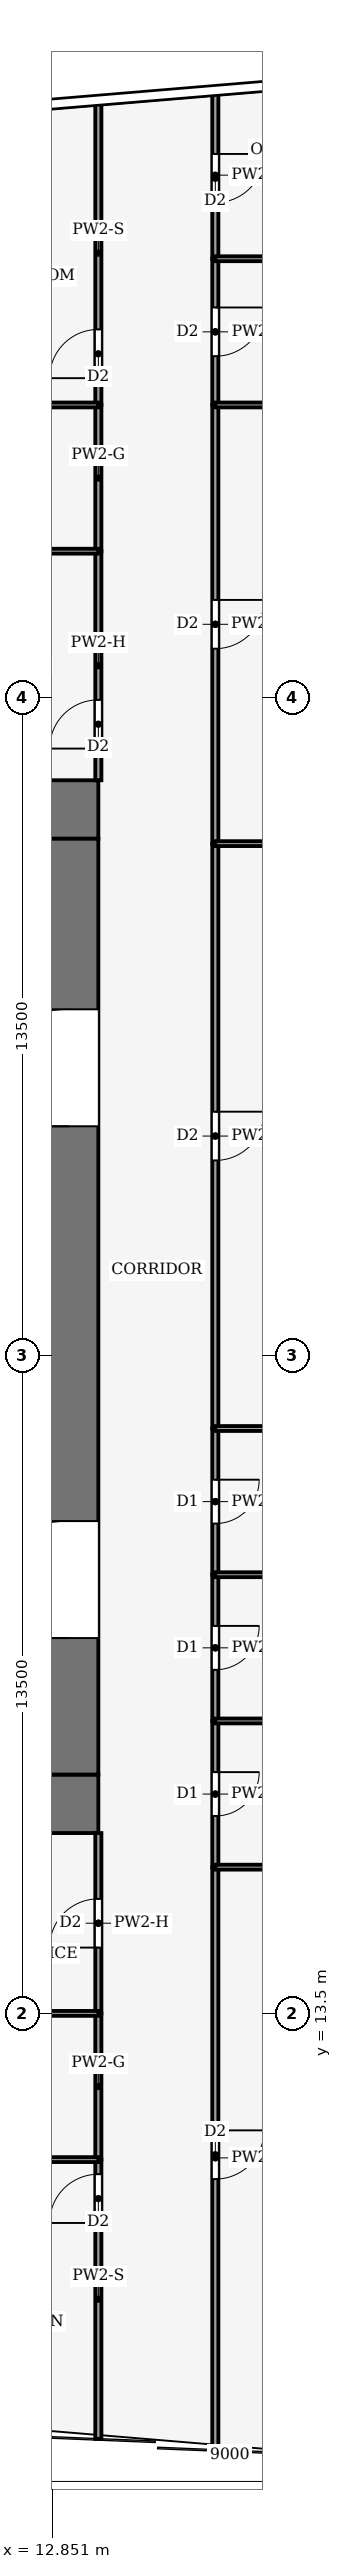
"""IFC4 building model, lengths in metres.
Left out: names, types, materials, properties, quantities, classifications, styles, units other than length and angle.
Written with IfcOpenShell. Run it as: python <this file> out.ifc"""

import sys

from ifc_helpers import new_model, si_unit, direction, frame, frame_2d, origin, place, context, subcontext, project, spatial, rectangle, extrude, element, fill, save


model = new_model("IFC4")
c1 = context("Model", 3, precision=1e-05, world=origin(), true_north=direction((0.0, 1.0)))
c2 = subcontext(c1, "Body", "Model", "MODEL_VIEW")
j1 = project(units=[si_unit("LENGTHUNIT", "METRE"), si_unit("PLANEANGLEUNIT", "RADIAN")], contexts=[c1])
p1 = place(None, origin())
s1 = spatial("IfcSite", under=j1, at=p1, CompositionType="ELEMENT")
p2 = place(p1, origin())
s2 = spatial("IfcBuilding", under=s1, at=p2, CompositionType="ELEMENT")
p3 = place(p2, frame((0.0, 0.0, 78.0)))
s3 = spatial("IfcBuildingStorey", under=s2, at=p3, CompositionType="ELEMENT", Elevation=78.0)
for number, where, z_axis, x_axis in (
    (1, (-13.8, 17.8, -0.13), (0.0, 0.0, 1.0), (1.0, 0.0, 0.0)),
    (2, (-13.8, 38.2, -0.13), (0.0, 0.0, 1.0), (1.0, 0.0, 0.0)),
):
    element("IfcWall", number, at=place(p3, frame(where, z_axis=z_axis, x_axis=x_axis)), inside=s3, PredefinedType="SHEAR", context=c2, shape_type="SweptSolid", body=[
        extrude(rectangle(XDim=27.6, YDim=1.2, at=frame_2d((13.8, 0.0))), origin(), (0.0, 0.0, 1.0), 4.0),
    ])
p4 = place(p3, frame((13.2, 18.4, -0.13), z_axis=(0.0, 0.0, 1.0), x_axis=(0.0, 1.0, 0.0)))
e3 = element("IfcWall", 3, at=p4, inside=s3, PredefinedType="SHEAR", context=c2, shape_type="SweptSolid", body=[
    extrude(rectangle(XDim=19.2, YDim=1.2, at=frame_2d((9.6, 0.0))), origin(), (0.0, 0.0, 1.0), 4.0),
])
p5 = place(p4, frame((2.8, 0.0, 0.13)))
e4 = element("IfcOpeningElement", 4, at=p5, cuts=e3, PredefinedType="OPENING", context=c2, shape_type="SweptSolid", body=[
    extrude(rectangle(XDim=2.4, YDim=2.4, at=frame_2d((1.2, 1.2))), frame((0.0, 0.61, 0.0), z_axis=(0.0, -1.0, 0.0), x_axis=(1.0, 0.0, 0.0)), (0.0, 0.0, 1.0), 1.22),
])
p6 = place(p4, frame((13.3, 0.0, 0.13)))
e5 = element("IfcOpeningElement", 5, at=p6, cuts=e3, PredefinedType="OPENING", context=c2, shape_type="SweptSolid", body=[
    extrude(rectangle(XDim=2.4, YDim=2.4, at=frame_2d((1.2, 1.2))), frame((0.0, 0.61, 0.0), z_axis=(0.0, -1.0, 0.0), x_axis=(1.0, 0.0, 0.0)), (0.0, 0.0, 1.0), 1.22),
])
p7 = place(p3, frame((16.2, 16.5, 0.0), z_axis=(0.0, 0.0, 1.0), x_axis=(0.0, -1.0, 0.0)))
e6 = element("IfcWall", 6, at=p7, inside=s3, PredefinedType="PARTITIONING", context=c2, shape_type="SweptSolid", body=[
    extrude(rectangle(XDim=11.93, YDim=0.125, at=frame_2d((5.965, 0.0))), origin(), (0.0, 0.0, 1.0), 3.04),
])
p8 = place(p7, frame((5.4, 0.0, 0.0)))
e7 = element("IfcOpeningElement", 7, at=p8, cuts=e6, PredefinedType="OPENING", context=c2, shape_type="SweptSolid", body=[
    extrude(rectangle(XDim=1.0, YDim=2.1, at=frame_2d((0.5, 1.05))), frame((0.0, 0.073, 0.0), z_axis=(0.0, -1.0, 0.0), x_axis=(1.0, 0.0, 0.0)), (0.0, 0.0, 1.0), 0.145),
])
p9 = place(p3, frame((16.2, 19.5, 0.0), z_axis=(0.0, 0.0, 1.0), x_axis=(0.0, -1.0, 0.0)))
e8 = element("IfcWall", 8, at=p9, inside=s3, PredefinedType="PARTITIONING", context=c2, shape_type="SweptSolid", body=[
    extrude(rectangle(XDim=3.0, YDim=0.125, at=frame_2d((1.5, 0.0))), origin(), (0.0, 0.0, 1.0), 3.14),
])
p10 = place(p9, frame((1.05, 0.0, 0.0)))
e9 = element("IfcOpeningElement", 9, at=p10, cuts=e8, PredefinedType="OPENING", context=c2, shape_type="SweptSolid", body=[
    extrude(rectangle(XDim=0.9, YDim=2.1, at=frame_2d((0.45, 1.05))), frame((0.0, 0.073, 0.0), z_axis=(0.0, -1.0, 0.0), x_axis=(1.0, 0.0, 0.0)), (0.0, 0.0, 1.0), 0.145),
])
p11 = place(p3, frame((16.2, 22.5, 0.0), z_axis=(0.0, 0.0, 1.0), x_axis=(0.0, -1.0, 0.0)))
e10 = element("IfcWall", 10, at=p11, inside=s3, PredefinedType="PARTITIONING", context=c2, shape_type="SweptSolid", body=[
    extrude(rectangle(XDim=3.0, YDim=0.125, at=frame_2d((1.5, 0.0))), origin(), (0.0, 0.0, 1.0), 3.87),
])
p12 = place(p11, frame((1.05, 0.0, 0.0)))
e11 = element("IfcOpeningElement", 11, at=p12, cuts=e10, PredefinedType="OPENING", context=c2, shape_type="SweptSolid", body=[
    extrude(rectangle(XDim=0.9, YDim=2.1, at=frame_2d((0.45, 1.05))), frame((0.0, 0.073, 0.0), z_axis=(0.0, -1.0, 0.0), x_axis=(1.0, 0.0, 0.0)), (0.0, 0.0, 1.0), 0.145),
])
p13 = place(p3, frame((16.2, 25.5, 0.0), z_axis=(0.0, 0.0, 1.0), x_axis=(0.0, -1.0, 0.0)))
e12 = element("IfcWall", 12, at=p13, inside=s3, PredefinedType="PARTITIONING", context=c2, shape_type="SweptSolid", body=[
    extrude(rectangle(XDim=3.0, YDim=0.125, at=frame_2d((1.5, 0.0))), origin(), (0.0, 0.0, 1.0), 3.48),
])
p14 = place(p13, frame((1.05, 0.0, 0.0)))
e13 = element("IfcOpeningElement", 13, at=p14, cuts=e12, PredefinedType="OPENING", context=c2, shape_type="SweptSolid", body=[
    extrude(rectangle(XDim=0.9, YDim=2.1, at=frame_2d((0.45, 1.05))), frame((0.0, 0.073, 0.0), z_axis=(0.0, -1.0, 0.0), x_axis=(1.0, 0.0, 0.0)), (0.0, 0.0, 1.0), 0.145),
])
p15 = place(p3, frame((16.2, 37.5, 0.0), z_axis=(0.0, 0.0, 1.0), x_axis=(0.0, -1.0, 0.0)))
e14 = element("IfcWall", 14, at=p15, inside=s3, PredefinedType="PARTITIONING", context=c2, shape_type="SweptSolid", body=[
    extrude(rectangle(XDim=12.0, YDim=0.125, at=frame_2d((6.0, 0.0))), origin(), (0.0, 0.0, 1.0), 3.48),
])
p16 = place(p15, frame((5.5, 0.0, 0.0)))
e15 = element("IfcOpeningElement", 15, at=p16, cuts=e14, PredefinedType="OPENING", context=c2, shape_type="SweptSolid", body=[
    extrude(rectangle(XDim=1.0, YDim=2.1, at=frame_2d((0.5, 1.05))), frame((0.0, 0.073, 0.0), z_axis=(0.0, -1.0, 0.0), x_axis=(1.0, 0.0, 0.0)), (0.0, 0.0, 1.0), 0.145),
])
p17 = place(p3, frame((16.2, 46.5, 0.0), z_axis=(0.0, 0.0, 1.0), x_axis=(0.0, -1.0, 0.0)))
e16 = element("IfcWall", 16, at=p17, inside=s3, PredefinedType="PARTITIONING", context=c2, shape_type="SweptSolid", body=[
    extrude(rectangle(XDim=9.0, YDim=0.125, at=frame_2d((4.5, 0.0))), origin(), (0.0, 0.0, 1.0), 3.14),
])
p18 = place(p17, frame((4.0, 0.0, 0.0)))
e17 = element("IfcOpeningElement", 17, at=p18, cuts=e16, PredefinedType="OPENING", context=c2, shape_type="SweptSolid", body=[
    extrude(rectangle(XDim=1.0, YDim=2.1, at=frame_2d((0.5, 1.05))), frame((0.0, 0.073, 0.0), z_axis=(0.0, -1.0, 0.0), x_axis=(1.0, 0.0, 0.0)), (0.0, 0.0, 1.0), 0.145),
])
p19 = place(p3, frame((16.2, 49.5, 0.0), z_axis=(0.0, 0.0, 1.0), x_axis=(0.0, -1.0, 0.0)))
e18 = element("IfcWall", 18, at=p19, inside=s3, PredefinedType="PARTITIONING", context=c2, shape_type="SweptSolid", body=[
    extrude(rectangle(XDim=3.0, YDim=0.125, at=frame_2d((1.5, 0.0))), origin(), (0.0, 0.0, 1.0), 3.87),
])
p20 = place(p19, frame((1.0, 0.0, 0.0)))
e19 = element("IfcOpeningElement", 19, at=p20, cuts=e18, PredefinedType="OPENING", context=c2, shape_type="SweptSolid", body=[
    extrude(rectangle(XDim=1.0, YDim=2.1, at=frame_2d((0.5, 1.05))), frame((0.0, 0.073, 0.0), z_axis=(0.0, -1.0, 0.0), x_axis=(1.0, 0.0, 0.0)), (0.0, 0.0, 1.0), 0.145),
])
p21 = place(p3, frame((16.2, 52.93, 0.0), z_axis=(0.0, 0.0, 1.0), x_axis=(0.0, -1.0, 0.0)))
e20 = element("IfcWall", 20, at=p21, inside=s3, PredefinedType="PARTITIONING", context=c2, shape_type="SweptSolid", body=[
    extrude(rectangle(XDim=3.43, YDim=0.125, at=frame_2d((1.715, 0.0))), origin(), (0.0, 0.0, 1.0), 3.04),
])
p22 = place(p21, frame((1.28, 0.0, 0.0)))
e21 = element("IfcOpeningElement", 21, at=p22, cuts=e20, PredefinedType="OPENING", context=c2, shape_type="SweptSolid", body=[
    extrude(rectangle(XDim=1.0, YDim=2.1, at=frame_2d((0.5, 1.05))), frame((0.0, 0.073, 0.0), z_axis=(0.0, -1.0, 0.0), x_axis=(1.0, 0.0, 0.0)), (0.0, 0.0, 1.0), 0.145),
])
p23 = place(p3, frame((13.8, 4.77, 0.0), z_axis=(0.0, 0.0, 1.0), x_axis=(0.0, 1.0, 0.0)))
e22 = element("IfcWall", 22, at=p23, inside=s3, PredefinedType="PARTITIONING", context=c2, shape_type="SweptSolid", body=[
    extrude(rectangle(XDim=5.73, YDim=0.125, at=frame_2d((2.865, 0.0))), origin(), (0.0, 0.0, 1.0), 3.04),
])
p24 = place(p23, frame((4.43, 0.0, 0.0)))
e23 = element("IfcOpeningElement", 23, at=p24, cuts=e22, PredefinedType="OPENING", context=c2, shape_type="SweptSolid", body=[
    extrude(rectangle(XDim=1.0, YDim=2.1, at=frame_2d((0.5, 1.05))), frame((0.0, 0.073, 0.0), z_axis=(0.0, -1.0, 0.0), x_axis=(1.0, 0.0, 0.0)), (0.0, 0.0, 1.0), 0.145),
])
p25 = place(p3, frame((13.8, 13.5, 0.0), z_axis=(0.0, 0.0, 1.0), x_axis=(0.0, -1.0, 0.0)))
e24 = element("IfcWall", 24, at=p25, inside=s3, PredefinedType="PARTITIONING", context=c2, shape_type="SweptSolid", body=[
    extrude(rectangle(XDim=3.0, YDim=0.125, at=frame_2d((1.5, 0.0))), origin(), (0.0, 0.0, 1.0), 3.87),
])
p26 = place(p3, frame((13.8, 13.5, 0.0), z_axis=(0.0, 0.0, 1.0), x_axis=(0.0, 1.0, 0.0)))
e25 = element("IfcWall", 25, at=p26, inside=s3, PredefinedType="PARTITIONING", context=c2, shape_type="SweptSolid", body=[
    extrude(rectangle(XDim=3.7, YDim=0.125, at=frame_2d((1.85, 0.0))), origin(), (0.0, 0.0, 1.0), 3.14),
])
p27 = place(p26, frame((1.35, 0.0, 0.0)))
e26 = element("IfcOpeningElement", 26, at=p27, cuts=e25, PredefinedType="OPENING", context=c2, shape_type="SweptSolid", body=[
    extrude(rectangle(XDim=1.0, YDim=2.1, at=frame_2d((0.5, 1.05))), frame((0.0, 0.073, 0.0), z_axis=(0.0, -1.0, 0.0), x_axis=(1.0, 0.0, 0.0)), (0.0, 0.0, 1.0), 0.145),
])
p28 = place(p3, frame((13.8, 38.8, 0.0), z_axis=(0.0, 0.0, 1.0), x_axis=(0.0, 1.0, 0.0)))
e27 = element("IfcWall", 27, at=p28, inside=s3, PredefinedType="PARTITIONING", context=c2, shape_type="SweptSolid", body=[
    extrude(rectangle(XDim=4.7, YDim=0.125, at=frame_2d((2.35, 0.0))), origin(), (0.0, 0.0, 1.0), 3.14),
])
p29 = place(p28, frame((0.65, 0.0, 0.0)))
e28 = element("IfcOpeningElement", 28, at=p29, cuts=e27, PredefinedType="OPENING", context=c2, shape_type="SweptSolid", body=[
    extrude(rectangle(XDim=1.0, YDim=2.1, at=frame_2d((0.5, 1.05))), frame((0.0, 0.073, 0.0), z_axis=(0.0, -1.0, 0.0), x_axis=(1.0, 0.0, 0.0)), (0.0, 0.0, 1.0), 0.145),
])
p30 = place(p3, frame((13.8, 46.5, 0.0), z_axis=(0.0, 0.0, 1.0), x_axis=(0.0, -1.0, 0.0)))
e29 = element("IfcWall", 29, at=p30, inside=s3, PredefinedType="PARTITIONING", context=c2, shape_type="SweptSolid", body=[
    extrude(rectangle(XDim=3.0, YDim=0.125, at=frame_2d((1.5, 0.0))), origin(), (0.0, 0.0, 1.0), 3.87),
])
p31 = place(p3, frame((13.8, 46.5, 0.0), z_axis=(0.0, 0.0, 1.0), x_axis=(0.0, 1.0, 0.0)))
e30 = element("IfcWall", 30, at=p31, inside=s3, PredefinedType="PARTITIONING", context=c2, shape_type="SweptSolid", body=[
    extrude(rectangle(XDim=6.23, YDim=0.125, at=frame_2d((3.115, 0.0))), origin(), (0.0, 0.0, 1.0), 3.04),
])
p32 = place(p31, frame((0.55, 0.0, 0.0)))
e31 = element("IfcOpeningElement", 31, at=p32, cuts=e30, PredefinedType="OPENING", context=c2, shape_type="SweptSolid", body=[
    extrude(rectangle(XDim=1.0, YDim=2.1, at=frame_2d((0.5, 1.05))), frame((0.0, 0.073, 0.0), z_axis=(0.0, -1.0, 0.0), x_axis=(1.0, 0.0, 0.0)), (0.0, 0.0, 1.0), 0.145),
])
p33 = place(p3, frame((23.587, 16.5, 0.0), z_axis=(0.0, 0.0, 1.0), x_axis=(-1.0, 0.0, 0.0)))
e32 = element("IfcWall", 32, at=p33, inside=s3, PredefinedType="PARTITIONING", context=c2, shape_type="SweptSolid", body=[
    extrude(rectangle(XDim=7.387, YDim=0.1, at=frame_2d((3.693, 0.0))), origin(), (0.0, 0.0, 1.0), 3.04),
])
p34 = place(p3, frame((23.34, 19.5, 0.0), z_axis=(0.0, 0.0, 1.0), x_axis=(-1.0, 0.0, 0.0)))
e33 = element("IfcWall", 33, at=p34, inside=s3, PredefinedType="PARTITIONING", context=c2, shape_type="SweptSolid", body=[
    extrude(rectangle(XDim=7.14, YDim=0.1, at=frame_2d((3.57, 0.0))), origin(), (0.0, 0.0, 1.0), 3.04),
])
p35 = place(p3, frame((23.094, 22.5, 0.0), z_axis=(0.0, 0.0, 1.0), x_axis=(-1.0, 0.0, 0.0)))
e34 = element("IfcWall", 34, at=p35, inside=s3, PredefinedType="PARTITIONING", context=c2, shape_type="SweptSolid", body=[
    extrude(rectangle(XDim=6.894, YDim=0.1, at=frame_2d((3.447, 0.0))), origin(), (0.0, 0.0, 1.0), 3.04),
])
p36 = place(p3, frame((22.847, 25.5, 0.0), z_axis=(0.0, 0.0, 1.0), x_axis=(-1.0, 0.0, 0.0)))
e35 = element("IfcWall", 35, at=p36, inside=s3, PredefinedType="PARTITIONING", context=c2, shape_type="SweptSolid", body=[
    extrude(rectangle(XDim=6.647, YDim=0.1, at=frame_2d((3.324, 0.0))), origin(), (0.0, 0.0, 1.0), 3.04),
])
p37 = place(p3, frame((23.299, 37.5, 0.0), z_axis=(0.0, 0.0, 1.0), x_axis=(-1.0, 0.0, 0.0)))
e36 = element("IfcWall", 36, at=p37, inside=s3, PredefinedType="PARTITIONING", context=c2, shape_type="SweptSolid", body=[
    extrude(rectangle(XDim=7.099, YDim=0.1, at=frame_2d((3.55, 0.0))), origin(), (0.0, 0.0, 1.0), 3.04),
])
p38 = place(p3, frame((24.039, 46.5, 0.0), z_axis=(0.0, 0.0, 1.0), x_axis=(-1.0, 0.0, 0.0)))
e37 = element("IfcWall", 37, at=p38, inside=s3, PredefinedType="PARTITIONING", context=c2, shape_type="SweptSolid", body=[
    extrude(rectangle(XDim=7.839, YDim=0.1, at=frame_2d((3.919, 0.0))), origin(), (0.0, 0.0, 1.0), 3.04),
])
p39 = place(p3, frame((23.487, 49.5, 0.0), z_axis=(0.0, 0.0, 1.0), x_axis=(-1.0, 0.0, 0.0)))
e38 = element("IfcWall", 38, at=p39, inside=s3, PredefinedType="PARTITIONING", context=c2, shape_type="SweptSolid", body=[
    extrude(rectangle(XDim=7.287, YDim=0.1, at=frame_2d((3.644, 0.0))), origin(), (0.0, 0.0, 1.0), 3.34),
])
p40 = place(p3, frame((7.5, 10.5, 0.0), z_axis=(0.0, 0.0, 1.0), x_axis=(1.0, 0.0, 0.0)))
e39 = element("IfcWall", 39, at=p40, inside=s3, PredefinedType="PARTITIONING", context=c2, shape_type="SweptSolid", body=[
    extrude(rectangle(XDim=6.3, YDim=0.1, at=frame_2d((3.15, 0.0))), origin(), (0.0, 0.0, 1.0), 3.39),
])
p41 = place(p40, frame((2.65, 0.0, 0.0)))
e40 = element("IfcOpeningElement", 40, at=p41, cuts=e39, PredefinedType="OPENING", context=c2, shape_type="SweptSolid", body=[
    extrude(rectangle(XDim=1.0, YDim=2.1, at=frame_2d((0.5, 1.05))), frame((0.0, 0.06, 0.0), z_axis=(0.0, -1.0, 0.0), x_axis=(1.0, 0.0, 0.0)), (0.0, 0.0, 1.0), 0.12),
])
p42 = place(p3, frame((13.8, 13.5, 0.0), z_axis=(0.0, 0.0, 1.0), x_axis=(-1.0, 0.0, 0.0)))
e41 = element("IfcWall", 41, at=p42, inside=s3, PredefinedType="PARTITIONING", context=c2, shape_type="SweptSolid", body=[
    extrude(rectangle(XDim=6.3, YDim=0.1, at=frame_2d((3.15, 0.0))), origin(), (0.0, 0.0, 1.0), 3.39),
])
p43 = place(p3, frame((7.5, 43.5, 0.0), z_axis=(0.0, 0.0, 1.0), x_axis=(1.0, 0.0, 0.0)))
e42 = element("IfcWall", 42, at=p43, inside=s3, PredefinedType="PARTITIONING", context=c2, shape_type="SweptSolid", body=[
    extrude(rectangle(XDim=6.3, YDim=0.1, at=frame_2d((3.15, 0.0))), origin(), (0.0, 0.0, 1.0), 3.39),
])
p44 = place(p43, frame((2.65, 0.0, 0.0)))
e43 = element("IfcOpeningElement", 43, at=p44, cuts=e42, PredefinedType="OPENING", context=c2, shape_type="SweptSolid", body=[
    extrude(rectangle(XDim=1.0, YDim=2.1, at=frame_2d((0.5, 1.05))), frame((0.0, 0.06, 0.0), z_axis=(0.0, -1.0, 0.0), x_axis=(1.0, 0.0, 0.0)), (0.0, 0.0, 1.0), 0.12),
])
p45 = place(p3, frame((13.8, 46.5, 0.0), z_axis=(0.0, 0.0, 1.0), x_axis=(-1.0, 0.0, 0.0)))
e44 = element("IfcWall", 44, at=p45, inside=s3, PredefinedType="PARTITIONING", context=c2, shape_type="SweptSolid", body=[
    extrude(rectangle(XDim=6.3, YDim=0.1, at=frame_2d((3.15, 0.0))), origin(), (0.0, 0.0, 1.0), 3.39),
])
p46 = place(p5, origin())
e45 = element("IfcDoor", 45, at=p46, inside=s3, OperationType="DOUBLE_DOOR_SINGLE_SWING", PredefinedType="DOOR", context=c2, shape_type="SweptSolid", body=[
    extrude(rectangle(XDim=2.4, YDim=2.4, at=frame_2d((1.2, 1.2))), frame((0.0, 0.025, 0.0), z_axis=(0.0, -1.0, 0.0), x_axis=(1.0, 0.0, 0.0)), (0.0, 0.0, 1.0), 0.05),
])
fill(e4, e45)
p47 = place(p6, origin())
e46 = element("IfcDoor", 46, at=p47, inside=s3, OperationType="DOUBLE_DOOR_SINGLE_SWING", PredefinedType="DOOR", context=c2, shape_type="SweptSolid", body=[
    extrude(rectangle(XDim=2.4, YDim=2.4, at=frame_2d((1.2, 1.2))), frame((0.0, 0.025, 0.0), z_axis=(0.0, -1.0, 0.0), x_axis=(1.0, 0.0, 0.0)), (0.0, 0.0, 1.0), 0.05),
])
fill(e5, e46)
p48 = place(p8, origin())
e47 = element("IfcDoor", 47, at=p48, inside=s3, OperationType="SINGLE_SWING_LEFT", PredefinedType="DOOR", context=c2, shape_type="SweptSolid", body=[
    extrude(rectangle(XDim=1.0, YDim=2.1, at=frame_2d((0.5, 1.05))), frame((0.0, 0.025, 0.0), z_axis=(0.0, -1.0, 0.0), x_axis=(1.0, 0.0, 0.0)), (0.0, 0.0, 1.0), 0.05),
])
fill(e7, e47)
p49 = place(p10, origin())
e48 = element("IfcDoor", 48, at=p49, inside=s3, OperationType="SINGLE_SWING_RIGHT", PredefinedType="DOOR", context=c2, shape_type="SweptSolid", body=[
    extrude(rectangle(XDim=0.9, YDim=2.1, at=frame_2d((0.45, 1.05))), frame((0.0, 0.025, 0.0), z_axis=(0.0, -1.0, 0.0), x_axis=(1.0, 0.0, 0.0)), (0.0, 0.0, 1.0), 0.05),
])
fill(e9, e48)
p50 = place(p12, origin())
e49 = element("IfcDoor", 49, at=p50, inside=s3, OperationType="SINGLE_SWING_LEFT", PredefinedType="DOOR", context=c2, shape_type="SweptSolid", body=[
    extrude(rectangle(XDim=0.9, YDim=2.1, at=frame_2d((0.45, 1.05))), frame((0.0, 0.025, 0.0), z_axis=(0.0, -1.0, 0.0), x_axis=(1.0, 0.0, 0.0)), (0.0, 0.0, 1.0), 0.05),
])
fill(e11, e49)
p51 = place(p14, origin())
e50 = element("IfcDoor", 50, at=p51, inside=s3, OperationType="SINGLE_SWING_RIGHT", PredefinedType="DOOR", context=c2, shape_type="SweptSolid", body=[
    extrude(rectangle(XDim=0.9, YDim=2.1, at=frame_2d((0.45, 1.05))), frame((0.0, 0.025, 0.0), z_axis=(0.0, -1.0, 0.0), x_axis=(1.0, 0.0, 0.0)), (0.0, 0.0, 1.0), 0.05),
])
fill(e13, e50)
p52 = place(p16, origin())
e51 = element("IfcDoor", 51, at=p52, inside=s3, OperationType="SINGLE_SWING_LEFT", PredefinedType="DOOR", context=c2, shape_type="SweptSolid", body=[
    extrude(rectangle(XDim=1.0, YDim=2.1, at=frame_2d((0.5, 1.05))), frame((0.0, 0.025, 0.0), z_axis=(0.0, -1.0, 0.0), x_axis=(1.0, 0.0, 0.0)), (0.0, 0.0, 1.0), 0.05),
])
fill(e15, e51)
p53 = place(p18, origin())
e52 = element("IfcDoor", 52, at=p53, inside=s3, OperationType="SINGLE_SWING_RIGHT", PredefinedType="DOOR", context=c2, shape_type="SweptSolid", body=[
    extrude(rectangle(XDim=1.0, YDim=2.1, at=frame_2d((0.5, 1.05))), frame((0.0, 0.025, 0.0), z_axis=(0.0, -1.0, 0.0), x_axis=(1.0, 0.0, 0.0)), (0.0, 0.0, 1.0), 0.05),
])
fill(e17, e52)
p54 = place(p20, origin())
e53 = element("IfcDoor", 53, at=p54, inside=s3, OperationType="SINGLE_SWING_LEFT", PredefinedType="DOOR", context=c2, shape_type="SweptSolid", body=[
    extrude(rectangle(XDim=1.0, YDim=2.1, at=frame_2d((0.5, 1.05))), frame((0.0, 0.025, 0.0), z_axis=(0.0, -1.0, 0.0), x_axis=(1.0, 0.0, 0.0)), (0.0, 0.0, 1.0), 0.05),
])
fill(e19, e53)
p55 = place(p22, origin())
e54 = element("IfcDoor", 54, at=p55, inside=s3, OperationType="SINGLE_SWING_RIGHT", PredefinedType="DOOR", context=c2, shape_type="SweptSolid", body=[
    extrude(rectangle(XDim=1.0, YDim=2.1, at=frame_2d((0.5, 1.05))), frame((0.0, 0.025, 0.0), z_axis=(0.0, -1.0, 0.0), x_axis=(1.0, 0.0, 0.0)), (0.0, 0.0, 1.0), 0.05),
])
fill(e21, e54)
p56 = place(p24, origin())
e55 = element("IfcDoor", 55, at=p56, inside=s3, OperationType="SINGLE_SWING_RIGHT", PredefinedType="DOOR", context=c2, shape_type="SweptSolid", body=[
    extrude(rectangle(XDim=1.0, YDim=2.1, at=frame_2d((0.5, 1.05))), frame((0.0, 0.025, 0.0), z_axis=(0.0, -1.0, 0.0), x_axis=(1.0, 0.0, 0.0)), (0.0, 0.0, 1.0), 0.05),
])
fill(e23, e55)
p57 = place(p27, origin())
e56 = element("IfcDoor", 56, at=p57, inside=s3, OperationType="SINGLE_SWING_RIGHT", PredefinedType="DOOR", context=c2, shape_type="SweptSolid", body=[
    extrude(rectangle(XDim=1.0, YDim=2.1, at=frame_2d((0.5, 1.05))), frame((0.0, 0.025, 0.0), z_axis=(0.0, -1.0, 0.0), x_axis=(1.0, 0.0, 0.0)), (0.0, 0.0, 1.0), 0.05),
])
fill(e26, e56)
p58 = place(p29, origin())
e57 = element("IfcDoor", 57, at=p58, inside=s3, OperationType="SINGLE_SWING_LEFT", PredefinedType="DOOR", context=c2, shape_type="SweptSolid", body=[
    extrude(rectangle(XDim=1.0, YDim=2.1, at=frame_2d((0.5, 1.05))), frame((0.0, 0.025, 0.0), z_axis=(0.0, -1.0, 0.0), x_axis=(1.0, 0.0, 0.0)), (0.0, 0.0, 1.0), 0.05),
])
fill(e28, e57)
p59 = place(p32, origin())
e58 = element("IfcDoor", 58, at=p59, inside=s3, OperationType="SINGLE_SWING_LEFT", PredefinedType="DOOR", context=c2, shape_type="SweptSolid", body=[
    extrude(rectangle(XDim=1.0, YDim=2.1, at=frame_2d((0.5, 1.05))), frame((0.0, 0.025, 0.0), z_axis=(0.0, -1.0, 0.0), x_axis=(1.0, 0.0, 0.0)), (0.0, 0.0, 1.0), 0.05),
])
fill(e31, e58)
save(model, sys.argv[1])
